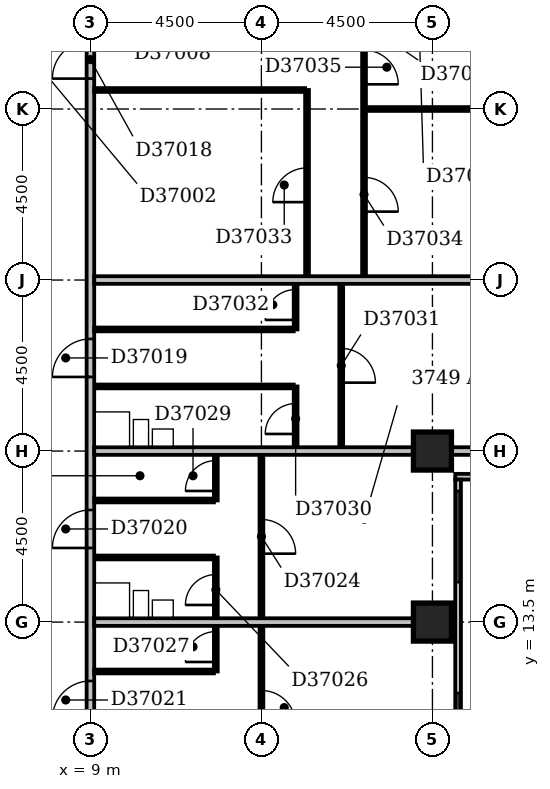
"""IFC4 building model, lengths in metres.
Left out: names, types, materials, properties, quantities, classifications, styles, units other than length and angle.
Written with IfcOpenShell. Run it as: python <this file> out.ifc"""

import sys

from ifc_helpers import new_model, si_unit, direction, frame, frame_2d, origin, origin_2d, place, context, subcontext, project, spatial, rectangle, extrude, element, fill, save


model = new_model("IFC4")
c1 = context("Model", 3, precision=1e-05, world=origin(), true_north=direction((0.0, 1.0)))
c2 = subcontext(c1, "Body", "Model", "MODEL_VIEW")
j1 = project(units=[si_unit("LENGTHUNIT", "METRE"), si_unit("PLANEANGLEUNIT", "RADIAN")], contexts=[c1])
p1 = place(None, origin())
s1 = spatial("IfcSite", under=j1, at=p1, CompositionType="ELEMENT")
p2 = place(p1, origin())
s2 = spatial("IfcBuilding", under=s1, at=p2, CompositionType="ELEMENT")
p3 = place(p2, frame((0.0, 0.0, 148.4)))
s3 = spatial("IfcBuildingStorey", under=s2, at=p3, CompositionType="ELEMENT", Elevation=148.4)
for number, where, z_axis, x_axis in (
    (1, (18.0, 13.5, -0.3), (0.0, 0.0, 1.0), (1.0, 0.0, 0.0)),
    (2, (18.0, 18.0, -0.3), (0.0, 0.0, 1.0), (1.0, 0.0, 0.0)),
):
    element("IfcColumn", number, at=place(p3, frame(where, z_axis=z_axis, x_axis=x_axis)), inside=s3, PredefinedType="COLUMN", context=c2, shape_type="SweptSolid", body=[
        extrude(rectangle(XDim=1.0, YDim=1.0, at=origin_2d()), origin(), (0.0, 0.0, 1.0), 3.6),
    ])
p4 = place(p3, frame((18.675, 8.4, 0.0), z_axis=(0.0, 0.0, 1.0), x_axis=(0.0, 1.0, 0.0)))
e3 = element("IfcWall", 3, at=p4, inside=s3, PredefinedType="STANDARD", context=c2, shape_type="SweptSolid", body=[
    extrude(rectangle(XDim=8.85, YDim=0.15, at=frame_2d((4.425, 0.0))), origin(), (0.0, 0.0, 1.0), 2.7),
])
p5 = place(p4, frame((1.434, 0.0, 0.6)))
e4 = element("IfcOpeningElement", 4, at=p5, cuts=e3, PredefinedType="OPENING", context=c2, shape_type="SweptSolid", body=[
    extrude(rectangle(XDim=1.8, YDim=1.8, at=frame_2d((0.9, 0.9))), frame((0.0, 0.087, 0.0), z_axis=(0.0, -1.0, 0.0), x_axis=(1.0, 0.0, 0.0)), (0.0, 0.0, 1.0), 0.174),
])
p6 = place(p4, frame((6.15, 0.0, 0.6)))
e5 = element("IfcOpeningElement", 5, at=p6, cuts=e3, PredefinedType="OPENING", context=c2, shape_type="SweptSolid", body=[
    extrude(rectangle(XDim=2.4, YDim=1.8, at=frame_2d((1.2, 0.9))), frame((0.0, 0.087, 0.0), z_axis=(0.0, -1.0, 0.0), x_axis=(1.0, 0.0, 0.0)), (0.0, 0.0, 1.0), 0.174),
])
p7 = place(p3, frame((18.6, 17.325, 0.0), z_axis=(0.0, 0.0, 1.0), x_axis=(1.0, 0.0, 0.0)))
e6 = element("IfcWall", 6, at=p7, inside=s3, PredefinedType="STANDARD", context=c2, shape_type="SweptSolid", body=[
    extrude(rectangle(XDim=4.65, YDim=0.15, at=frame_2d((2.325, 0.0))), origin(), (0.0, 0.0, 1.0), 2.7),
])
p8 = place(p7, frame((0.45, 0.0, 0.6)))
e7 = element("IfcOpeningElement", 7, at=p8, cuts=e6, PredefinedType="OPENING", context=c2, shape_type="SweptSolid", body=[
    extrude(rectangle(XDim=2.4, YDim=1.8, at=frame_2d((1.2, 0.9))), frame((0.0, 0.087, 0.0), z_axis=(0.0, -1.0, 0.0), x_axis=(1.0, 0.0, 0.0)), (0.0, 0.0, 1.0), 0.174),
])
p9 = place(p3, frame((9.0, 5.0, 0.0), z_axis=(0.0, 0.0, 1.0), x_axis=(0.0, 1.0, 0.0)))
e8 = element("IfcWall", 8, at=p9, inside=s3, PredefinedType="PARTITIONING", context=c2, shape_type="SweptSolid", body=[
    extrude(rectangle(XDim=27.75, YDim=0.2, at=frame_2d((13.875, 0.0))), origin(), (0.0, 0.0, 1.0), 3.3),
])
p10 = place(p9, frame((22.8, 0.0, 0.0)))
e9 = element("IfcOpeningElement", 9, at=p10, cuts=e8, PredefinedType="OPENING", context=c2, shape_type="SweptSolid", body=[
    extrude(rectangle(XDim=1.0, YDim=2.1, at=frame_2d((0.5, 1.05))), frame((0.0, 0.112, 0.0), z_axis=(0.0, -1.0, 0.0), x_axis=(1.0, 0.0, 0.0)), (0.0, 0.0, 1.0), 0.224),
])
p11 = place(p9, frame((14.95, 0.0, 0.0)))
e10 = element("IfcOpeningElement", 10, at=p11, cuts=e8, PredefinedType="OPENING", context=c2, shape_type="SweptSolid", body=[
    extrude(rectangle(XDim=1.0, YDim=2.1, at=frame_2d((0.5, 1.05))), frame((0.0, 0.112, 0.0), z_axis=(0.0, -1.0, 0.0), x_axis=(1.0, 0.0, 0.0)), (0.0, 0.0, 1.0), 0.224),
])
p12 = place(p9, frame((10.45, 0.0, 0.0)))
e11 = element("IfcOpeningElement", 11, at=p12, cuts=e8, PredefinedType="OPENING", context=c2, shape_type="SweptSolid", body=[
    extrude(rectangle(XDim=1.0, YDim=2.1, at=frame_2d((0.5, 1.05))), frame((0.0, 0.112, 0.0), z_axis=(0.0, -1.0, 0.0), x_axis=(1.0, 0.0, 0.0)), (0.0, 0.0, 1.0), 0.224),
])
p13 = place(p9, frame((5.95, 0.0, 0.0)))
e12 = element("IfcOpeningElement", 12, at=p13, cuts=e8, PredefinedType="OPENING", context=c2, shape_type="SweptSolid", body=[
    extrude(rectangle(XDim=1.0, YDim=2.1, at=frame_2d((0.5, 1.05))), frame((0.0, 0.112, 0.0), z_axis=(0.0, -1.0, 0.0), x_axis=(1.0, 0.0, 0.0)), (0.0, 0.0, 1.0), 0.224),
])
p14 = place(p9, frame((1.5, 0.0, 0.0)))
e13 = element("IfcOpeningElement", 13, at=p14, cuts=e8, PredefinedType="OPENING", context=c2, shape_type="SweptSolid", body=[
    extrude(rectangle(XDim=0.9, YDim=2.1, at=frame_2d((0.45, 1.05))), frame((0.0, 0.112, 0.0), z_axis=(0.0, -1.0, 0.0), x_axis=(1.0, 0.0, 0.0)), (0.0, 0.0, 1.0), 0.224),
])
p15 = place(p3, frame((13.5, 9.5, 0.0), z_axis=(0.0, 0.0, 1.0), x_axis=(0.0, 1.0, 0.0)))
e14 = element("IfcWall", 14, at=p15, inside=s3, PredefinedType="PARTITIONING", context=c2, shape_type="SweptSolid", body=[
    extrude(rectangle(XDim=8.4, YDim=0.1, at=frame_2d((4.2, 0.0))), origin(), (0.0, 0.0, 1.0), 3.3),
])
p16 = place(p15, frame((5.8, 0.0, 0.0)))
e15 = element("IfcOpeningElement", 15, at=p16, cuts=e14, PredefinedType="OPENING", context=c2, shape_type="SweptSolid", body=[
    extrude(rectangle(XDim=0.9, YDim=2.1, at=frame_2d((0.45, 1.05))), frame((0.0, 0.062, 0.0), z_axis=(0.0, -1.0, 0.0), x_axis=(1.0, 0.0, 0.0)), (0.0, 0.0, 1.0), 0.124),
])
p17 = place(p15, frame((1.3, 0.0, 0.0)))
e16 = element("IfcOpeningElement", 16, at=p17, cuts=e14, PredefinedType="OPENING", context=c2, shape_type="SweptSolid", body=[
    extrude(rectangle(XDim=0.9, YDim=2.1, at=frame_2d((0.45, 1.05))), frame((0.0, 0.062, 0.0), z_axis=(0.0, -1.0, 0.0), x_axis=(1.0, 0.0, 0.0)), (0.0, 0.0, 1.0), 0.124),
])
p18 = place(p3, frame((9.1, 12.2, 0.0), z_axis=(0.0, 0.0, 1.0), x_axis=(1.0, 0.0, 0.0)))
e17 = element("IfcWall", 17, at=p18, inside=s3, PredefinedType="PARTITIONING", context=c2, shape_type="SweptSolid", body=[
    extrude(rectangle(XDim=3.15, YDim=0.1, at=frame_2d((1.575, 0.0))), origin(), (0.0, 0.0, 1.0), 3.3),
])
p19 = place(p3, frame((12.3, 12.2, 0.0), z_axis=(0.0, 0.0, 1.0), x_axis=(0.0, 1.0, 0.0)))
e18 = element("IfcWall", 18, at=p19, inside=s3, PredefinedType="PARTITIONING", context=c2, shape_type="SweptSolid", body=[
    extrude(rectangle(XDim=3.0, YDim=0.1, at=frame_2d((1.5, 0.0))), origin(), (0.0, 0.0, 1.0), 3.3),
])
p20 = place(p19, frame((1.75, 0.0, 0.0)))
e19 = element("IfcOpeningElement", 19, at=p20, cuts=e18, PredefinedType="OPENING", context=c2, shape_type="SweptSolid", body=[
    extrude(rectangle(XDim=0.8, YDim=2.1, at=frame_2d((0.4, 1.05))), frame((0.0, 0.062, 0.0), z_axis=(0.0, -1.0, 0.0), x_axis=(1.0, 0.0, 0.0)), (0.0, 0.0, 1.0), 0.124),
])
p21 = place(p19, frame((0.25, 0.0, 0.0)))
e20 = element("IfcOpeningElement", 20, at=p21, cuts=e18, PredefinedType="OPENING", context=c2, shape_type="SweptSolid", body=[
    extrude(rectangle(XDim=0.8, YDim=2.1, at=frame_2d((0.4, 1.05))), frame((0.0, 0.062, 0.0), z_axis=(0.0, -1.0, 0.0), x_axis=(1.0, 0.0, 0.0)), (0.0, 0.0, 1.0), 0.124),
])
p22 = place(p3, frame((9.1, 13.5, 0.0), z_axis=(0.0, 0.0, 1.0), x_axis=(1.0, 0.0, 0.0)))
e21 = element("IfcWall", 21, at=p22, inside=s3, PredefinedType="PARTITIONING", context=c2, shape_type="SweptSolid", body=[
    extrude(rectangle(XDim=8.4, YDim=0.2, at=frame_2d((4.2, 0.0))), origin(), (0.0, 0.0, 1.0), 3.3),
])
p23 = place(p3, frame((9.1, 15.2, 0.0), z_axis=(0.0, 0.0, 1.0), x_axis=(1.0, 0.0, 0.0)))
e22 = element("IfcWall", 22, at=p23, inside=s3, PredefinedType="PLUMBINGWALL", context=c2, shape_type="SweptSolid", body=[
    extrude(rectangle(XDim=3.15, YDim=0.1, at=frame_2d((1.575, 0.0))), origin(), (0.0, 0.0, 1.0), 3.3),
])
p24 = place(p3, frame((9.1, 16.7, 0.0), z_axis=(0.0, 0.0, 1.0), x_axis=(1.0, 0.0, 0.0)))
e23 = element("IfcWall", 23, at=p24, inside=s3, PredefinedType="PARTITIONING", context=c2, shape_type="SweptSolid", body=[
    extrude(rectangle(XDim=3.15, YDim=0.1, at=frame_2d((1.575, 0.0))), origin(), (0.0, 0.0, 1.0), 3.3),
])
p25 = place(p3, frame((12.3, 16.7, 0.0), z_axis=(0.0, 0.0, 1.0), x_axis=(0.0, 1.0, 0.0)))
e24 = element("IfcWall", 24, at=p25, inside=s3, PredefinedType="PARTITIONING", context=c2, shape_type="SweptSolid", body=[
    extrude(rectangle(XDim=1.2, YDim=0.1, at=frame_2d((0.6, 0.0))), origin(), (0.0, 0.0, 1.0), 3.3),
])
p26 = place(p25, frame((0.25, 0.0, 0.0)))
e25 = element("IfcOpeningElement", 25, at=p26, cuts=e24, PredefinedType="OPENING", context=c2, shape_type="SweptSolid", body=[
    extrude(rectangle(XDim=0.8, YDim=2.1, at=frame_2d((0.4, 1.05))), frame((0.0, 0.062, 0.0), z_axis=(0.0, -1.0, 0.0), x_axis=(1.0, 0.0, 0.0)), (0.0, 0.0, 1.0), 0.124),
])
p27 = place(p3, frame((9.1, 18.0, 0.0), z_axis=(0.0, 0.0, 1.0), x_axis=(1.0, 0.0, 0.0)))
e26 = element("IfcWall", 26, at=p27, inside=s3, PredefinedType="PARTITIONING", context=c2, shape_type="SweptSolid", body=[
    extrude(rectangle(XDim=8.4, YDim=0.2, at=frame_2d((4.2, 0.0))), origin(), (0.0, 0.0, 1.0), 2.6),
])
p28 = place(p3, frame((18.5, 18.0, 0.0), z_axis=(0.0, 0.0, 1.0), x_axis=(1.0, 0.0, 0.0)))
e27 = element("IfcWall", 27, at=p28, inside=s3, PredefinedType="PARTITIONING", context=c2, shape_type="SweptSolid", body=[
    extrude(rectangle(XDim=3.5, YDim=0.2, at=frame_2d((1.75, 0.0))), origin(), (0.0, 0.0, 1.0), 2.7),
])
p29 = place(p3, frame((14.4, 18.1, 0.0), z_axis=(0.0, 0.0, 1.0), x_axis=(0.0, 1.0, 0.0)))
e28 = element("IfcWall", 28, at=p29, inside=s3, PredefinedType="PARTITIONING", context=c2, shape_type="SweptSolid", body=[
    extrude(rectangle(XDim=1.6, YDim=0.1, at=frame_2d((0.8, 0.0))), origin(), (0.0, 0.0, 1.0), 3.3),
])
p30 = place(p29, frame((0.35, 0.0, 0.0)))
e29 = element("IfcOpeningElement", 29, at=p30, cuts=e28, PredefinedType="OPENING", context=c2, shape_type="SweptSolid", body=[
    extrude(rectangle(XDim=0.8, YDim=2.1, at=frame_2d((0.4, 1.05))), frame((0.0, 0.062, 0.0), z_axis=(0.0, -1.0, 0.0), x_axis=(1.0, 0.0, 0.0)), (0.0, 0.0, 1.0), 0.124),
])
p31 = place(p3, frame((15.6, 18.1, 0.0), z_axis=(0.0, 0.0, 1.0), x_axis=(0.0, 1.0, 0.0)))
e30 = element("IfcWall", 30, at=p31, inside=s3, PredefinedType="PARTITIONING", context=c2, shape_type="SweptSolid", body=[
    extrude(rectangle(XDim=4.3, YDim=0.1, at=frame_2d((2.15, 0.0))), origin(), (0.0, 0.0, 1.0), 3.3),
])
p32 = place(p31, frame((1.7, 0.0, 0.0)))
e31 = element("IfcOpeningElement", 31, at=p32, cuts=e30, PredefinedType="OPENING", context=c2, shape_type="SweptSolid", body=[
    extrude(rectangle(XDim=0.9, YDim=2.1, at=frame_2d((0.45, 1.05))), frame((0.0, 0.062, 0.0), z_axis=(0.0, -1.0, 0.0), x_axis=(1.0, 0.0, 0.0)), (0.0, 0.0, 1.0), 0.124),
])
p33 = place(p3, frame((9.1, 19.7, 0.0), z_axis=(0.0, 0.0, 1.0), x_axis=(1.0, 0.0, 0.0)))
e32 = element("IfcWall", 32, at=p33, inside=s3, PredefinedType="PLUMBINGWALL", context=c2, shape_type="SweptSolid", body=[
    extrude(rectangle(XDim=5.25, YDim=0.1, at=frame_2d((2.625, 0.0))), origin(), (0.0, 0.0, 1.0), 3.3),
])
p34 = place(p3, frame((9.1, 21.2, 0.0), z_axis=(0.0, 0.0, 1.0), x_axis=(1.0, 0.0, 0.0)))
e33 = element("IfcWall", 33, at=p34, inside=s3, PredefinedType="PARTITIONING", context=c2, shape_type="SweptSolid", body=[
    extrude(rectangle(XDim=5.25, YDim=0.1, at=frame_2d((2.625, 0.0))), origin(), (0.0, 0.0, 1.0), 3.3),
])
p35 = place(p3, frame((14.4, 21.2, 0.0), z_axis=(0.0, 0.0, 1.0), x_axis=(0.0, 1.0, 0.0)))
e34 = element("IfcWall", 34, at=p35, inside=s3, PredefinedType="PARTITIONING", context=c2, shape_type="SweptSolid", body=[
    extrude(rectangle(XDim=1.2, YDim=0.1, at=frame_2d((0.6, 0.0))), origin(), (0.0, 0.0, 1.0), 3.3),
])
p36 = place(p35, frame((0.25, 0.0, 0.0)))
e35 = element("IfcOpeningElement", 35, at=p36, cuts=e34, PredefinedType="OPENING", context=c2, shape_type="SweptSolid", body=[
    extrude(rectangle(XDim=0.8, YDim=2.1, at=frame_2d((0.4, 1.05))), frame((0.0, 0.062, 0.0), z_axis=(0.0, -1.0, 0.0), x_axis=(1.0, 0.0, 0.0)), (0.0, 0.0, 1.0), 0.124),
])
p37 = place(p3, frame((9.1, 22.5, 0.0), z_axis=(0.0, 0.0, 1.0), x_axis=(1.0, 0.0, 0.0)))
e36 = element("IfcWall", 36, at=p37, inside=s3, PredefinedType="PARTITIONING", context=c2, shape_type="SweptSolid", body=[
    extrude(rectangle(XDim=12.9, YDim=0.2, at=frame_2d((6.45, 0.0))), origin(), (0.0, 0.0, 1.0), 3.3),
])
p38 = place(p3, frame((14.7, 22.6, 0.0), z_axis=(0.0, 0.0, 1.0), x_axis=(0.0, 1.0, 0.0)))
e37 = element("IfcWall", 37, at=p38, inside=s3, PredefinedType="PARTITIONING", context=c2, shape_type="SweptSolid", body=[
    extrude(rectangle(XDim=4.9, YDim=0.1, at=frame_2d((2.45, 0.0))), origin(), (0.0, 0.0, 1.0), 3.3),
])
p39 = place(p38, frame((1.95, 0.0, 0.0)))
e38 = element("IfcOpeningElement", 38, at=p39, cuts=e37, PredefinedType="OPENING", context=c2, shape_type="SweptSolid", body=[
    extrude(rectangle(XDim=0.9, YDim=2.1, at=frame_2d((0.45, 1.05))), frame((0.0, 0.062, 0.0), z_axis=(0.0, -1.0, 0.0), x_axis=(1.0, 0.0, 0.0)), (0.0, 0.0, 1.0), 0.124),
])
p40 = place(p3, frame((16.2, 22.6, 0.0), z_axis=(0.0, 0.0, 1.0), x_axis=(0.0, 1.0, 0.0)))
e39 = element("IfcWall", 39, at=p40, inside=s3, PredefinedType="PARTITIONING", context=c2, shape_type="SweptSolid", body=[
    extrude(rectangle(XDim=8.8, YDim=0.1, at=frame_2d((4.4, 0.0))), origin(), (0.0, 0.0, 1.0), 3.3),
])
p41 = place(p40, frame((1.7, 0.0, 0.0)))
e40 = element("IfcOpeningElement", 40, at=p41, cuts=e39, PredefinedType="OPENING", context=c2, shape_type="SweptSolid", body=[
    extrude(rectangle(XDim=0.9, YDim=2.1, at=frame_2d((0.45, 1.05))), frame((0.0, 0.062, 0.0), z_axis=(0.0, -1.0, 0.0), x_axis=(1.0, 0.0, 0.0)), (0.0, 0.0, 1.0), 0.124),
])
p42 = place(p40, frame((5.05, 0.0, 0.0)))
e41 = element("IfcOpeningElement", 41, at=p42, cuts=e39, PredefinedType="OPENING", context=c2, shape_type="SweptSolid", body=[
    extrude(rectangle(XDim=0.9, YDim=2.1, at=frame_2d((0.45, 1.05))), frame((0.0, 0.062, 0.0), z_axis=(0.0, -1.0, 0.0), x_axis=(1.0, 0.0, 0.0)), (0.0, 0.0, 1.0), 0.124),
])
p43 = place(p3, frame((16.25, 27.0, 0.0), z_axis=(0.0, 0.0, 1.0), x_axis=(1.0, 0.0, 0.0)))
e42 = element("IfcWall", 42, at=p43, inside=s3, PredefinedType="PARTITIONING", context=c2, shape_type="SweptSolid", body=[
    extrude(rectangle(XDim=5.75, YDim=0.1, at=frame_2d((2.875, 0.0))), origin(), (0.0, 0.0, 1.0), 2.7),
])
p44 = place(p3, frame((9.1, 27.5, 0.0), z_axis=(0.0, 0.0, 1.0), x_axis=(1.0, 0.0, 0.0)))
e43 = element("IfcWall", 43, at=p44, inside=s3, PredefinedType="PARTITIONING", context=c2, shape_type="SweptSolid", body=[
    extrude(rectangle(XDim=5.55, YDim=0.1, at=frame_2d((2.775, 0.0))), origin(), (0.0, 0.0, 1.0), 2.7),
])
p45 = place(p5, origin())
e44 = element("IfcWindow", 44, at=p45, inside=s3, PartitioningType="SINGLE_PANEL", PredefinedType="WINDOW", context=c2, shape_type="SweptSolid", body=[
    extrude(rectangle(XDim=1.8, YDim=1.8, at=frame_2d((0.9, 0.9))), frame((0.0, 0.03, 0.0), z_axis=(0.0, -1.0, 0.0), x_axis=(1.0, 0.0, 0.0)), (0.0, 0.0, 1.0), 0.06),
])
fill(e4, e44)
p46 = place(p6, origin())
e45 = element("IfcWindow", 45, at=p46, inside=s3, PartitioningType="SINGLE_PANEL", PredefinedType="WINDOW", context=c2, shape_type="SweptSolid", body=[
    extrude(rectangle(XDim=2.4, YDim=1.8, at=frame_2d((1.2, 0.9))), frame((0.0, 0.03, 0.0), z_axis=(0.0, -1.0, 0.0), x_axis=(1.0, 0.0, 0.0)), (0.0, 0.0, 1.0), 0.06),
])
fill(e5, e45)
p47 = place(p10, origin())
e46 = element("IfcDoor", 46, at=p47, inside=s3, OperationType="SINGLE_SWING_LEFT", PredefinedType="DOOR", context=c2, shape_type="SweptSolid", body=[
    extrude(rectangle(XDim=1.0, YDim=2.1, at=frame_2d((0.5, 1.05))), frame((0.0, 0.025, 0.0), z_axis=(0.0, -1.0, 0.0), x_axis=(1.0, 0.0, 0.0)), (0.0, 0.0, 1.0), 0.05),
])
fill(e9, e46)
p48 = place(p11, origin())
e47 = element("IfcDoor", 47, at=p48, inside=s3, OperationType="SINGLE_SWING_LEFT", PredefinedType="DOOR", context=c2, shape_type="SweptSolid", body=[
    extrude(rectangle(XDim=1.0, YDim=2.1, at=frame_2d((0.5, 1.05))), frame((0.0, 0.025, 0.0), z_axis=(0.0, -1.0, 0.0), x_axis=(1.0, 0.0, 0.0)), (0.0, 0.0, 1.0), 0.05),
])
fill(e10, e47)
p49 = place(p12, origin())
e48 = element("IfcDoor", 48, at=p49, inside=s3, OperationType="SINGLE_SWING_LEFT", PredefinedType="DOOR", context=c2, shape_type="SweptSolid", body=[
    extrude(rectangle(XDim=1.0, YDim=2.1, at=frame_2d((0.5, 1.05))), frame((0.0, 0.025, 0.0), z_axis=(0.0, -1.0, 0.0), x_axis=(1.0, 0.0, 0.0)), (0.0, 0.0, 1.0), 0.05),
])
fill(e11, e48)
p50 = place(p13, origin())
e49 = element("IfcDoor", 49, at=p50, inside=s3, OperationType="SINGLE_SWING_LEFT", PredefinedType="DOOR", context=c2, shape_type="SweptSolid", body=[
    extrude(rectangle(XDim=1.0, YDim=2.1, at=frame_2d((0.5, 1.05))), frame((0.0, 0.025, 0.0), z_axis=(0.0, -1.0, 0.0), x_axis=(1.0, 0.0, 0.0)), (0.0, 0.0, 1.0), 0.05),
])
fill(e12, e49)
p51 = place(p16, frame((0.9, 0.0, 0.0), z_axis=(0.0, 0.0, 1.0), x_axis=(-1.0, 0.0, 0.0)))
e50 = element("IfcDoor", 50, at=p51, inside=s3, OperationType="SINGLE_SWING_RIGHT", PredefinedType="DOOR", context=c2, shape_type="SweptSolid", body=[
    extrude(rectangle(XDim=0.9, YDim=2.1, at=frame_2d((0.45, 1.05))), frame((0.0, 0.025, 0.0), z_axis=(0.0, -1.0, 0.0), x_axis=(1.0, 0.0, 0.0)), (0.0, 0.0, 1.0), 0.05),
])
fill(e15, e50)
p52 = place(p17, frame((0.9, 0.0, 0.0), z_axis=(0.0, 0.0, 1.0), x_axis=(-1.0, 0.0, 0.0)))
e51 = element("IfcDoor", 51, at=p52, inside=s3, OperationType="SINGLE_SWING_RIGHT", PredefinedType="DOOR", context=c2, shape_type="SweptSolid", body=[
    extrude(rectangle(XDim=0.9, YDim=2.1, at=frame_2d((0.45, 1.05))), frame((0.0, 0.025, 0.0), z_axis=(0.0, -1.0, 0.0), x_axis=(1.0, 0.0, 0.0)), (0.0, 0.0, 1.0), 0.05),
])
fill(e16, e51)
p53 = place(p20, origin())
e52 = element("IfcDoor", 52, at=p53, inside=s3, OperationType="SINGLE_SWING_LEFT", PredefinedType="DOOR", context=c2, shape_type="SweptSolid", body=[
    extrude(rectangle(XDim=0.8, YDim=2.1, at=frame_2d((0.4, 1.05))), frame((0.0, 0.025, 0.0), z_axis=(0.0, -1.0, 0.0), x_axis=(1.0, 0.0, 0.0)), (0.0, 0.0, 1.0), 0.05),
])
fill(e19, e52)
p54 = place(p21, origin())
e53 = element("IfcDoor", 53, at=p54, inside=s3, OperationType="SINGLE_SWING_LEFT", PredefinedType="DOOR", context=c2, shape_type="SweptSolid", body=[
    extrude(rectangle(XDim=0.8, YDim=2.1, at=frame_2d((0.4, 1.05))), frame((0.0, 0.025, 0.0), z_axis=(0.0, -1.0, 0.0), x_axis=(1.0, 0.0, 0.0)), (0.0, 0.0, 1.0), 0.05),
])
fill(e20, e53)
p55 = place(p26, origin())
e54 = element("IfcDoor", 54, at=p55, inside=s3, OperationType="SINGLE_SWING_LEFT", PredefinedType="DOOR", context=c2, shape_type="SweptSolid", body=[
    extrude(rectangle(XDim=0.8, YDim=2.1, at=frame_2d((0.4, 1.05))), frame((0.0, 0.025, 0.0), z_axis=(0.0, -1.0, 0.0), x_axis=(1.0, 0.0, 0.0)), (0.0, 0.0, 1.0), 0.05),
])
fill(e25, e54)
p56 = place(p30, origin())
e55 = element("IfcDoor", 55, at=p56, inside=s3, OperationType="SINGLE_SWING_LEFT", PredefinedType="DOOR", context=c2, shape_type="SweptSolid", body=[
    extrude(rectangle(XDim=0.8, YDim=2.1, at=frame_2d((0.4, 1.05))), frame((0.0, 0.025, 0.0), z_axis=(0.0, -1.0, 0.0), x_axis=(1.0, 0.0, 0.0)), (0.0, 0.0, 1.0), 0.05),
])
fill(e29, e55)
p57 = place(p32, frame((0.9, 0.0, 0.0), z_axis=(0.0, 0.0, 1.0), x_axis=(-1.0, 0.0, 0.0)))
e56 = element("IfcDoor", 56, at=p57, inside=s3, OperationType="SINGLE_SWING_RIGHT", PredefinedType="DOOR", context=c2, shape_type="SweptSolid", body=[
    extrude(rectangle(XDim=0.9, YDim=2.1, at=frame_2d((0.45, 1.05))), frame((0.0, 0.025, 0.0), z_axis=(0.0, -1.0, 0.0), x_axis=(1.0, 0.0, 0.0)), (0.0, 0.0, 1.0), 0.05),
])
fill(e31, e56)
p58 = place(p36, origin())
e57 = element("IfcDoor", 57, at=p58, inside=s3, OperationType="SINGLE_SWING_LEFT", PredefinedType="DOOR", context=c2, shape_type="SweptSolid", body=[
    extrude(rectangle(XDim=0.8, YDim=2.1, at=frame_2d((0.4, 1.05))), frame((0.0, 0.025, 0.0), z_axis=(0.0, -1.0, 0.0), x_axis=(1.0, 0.0, 0.0)), (0.0, 0.0, 1.0), 0.05),
])
fill(e35, e57)
p59 = place(p39, origin())
e58 = element("IfcDoor", 58, at=p59, inside=s3, OperationType="SINGLE_SWING_LEFT", PredefinedType="DOOR", context=c2, shape_type="SweptSolid", body=[
    extrude(rectangle(XDim=0.9, YDim=2.1, at=frame_2d((0.45, 1.05))), frame((0.0, 0.025, 0.0), z_axis=(0.0, -1.0, 0.0), x_axis=(1.0, 0.0, 0.0)), (0.0, 0.0, 1.0), 0.05),
])
fill(e38, e58)
p60 = place(p41, frame((0.9, 0.0, 0.0), z_axis=(0.0, 0.0, 1.0), x_axis=(-1.0, 0.0, 0.0)))
e59 = element("IfcDoor", 59, at=p60, inside=s3, OperationType="SINGLE_SWING_RIGHT", PredefinedType="DOOR", context=c2, shape_type="SweptSolid", body=[
    extrude(rectangle(XDim=0.9, YDim=2.1, at=frame_2d((0.45, 1.05))), frame((0.0, 0.025, 0.0), z_axis=(0.0, -1.0, 0.0), x_axis=(1.0, 0.0, 0.0)), (0.0, 0.0, 1.0), 0.05),
])
fill(e40, e59)
p61 = place(p42, frame((0.9, 0.0, 0.0), z_axis=(0.0, 0.0, 1.0), x_axis=(-1.0, 0.0, 0.0)))
e60 = element("IfcDoor", 60, at=p61, inside=s3, OperationType="SINGLE_SWING_RIGHT", PredefinedType="DOOR", context=c2, shape_type="SweptSolid", body=[
    extrude(rectangle(XDim=0.9, YDim=2.1, at=frame_2d((0.45, 1.05))), frame((0.0, 0.025, 0.0), z_axis=(0.0, -1.0, 0.0), x_axis=(1.0, 0.0, 0.0)), (0.0, 0.0, 1.0), 0.05),
])
fill(e41, e60)
save(model, sys.argv[1])
